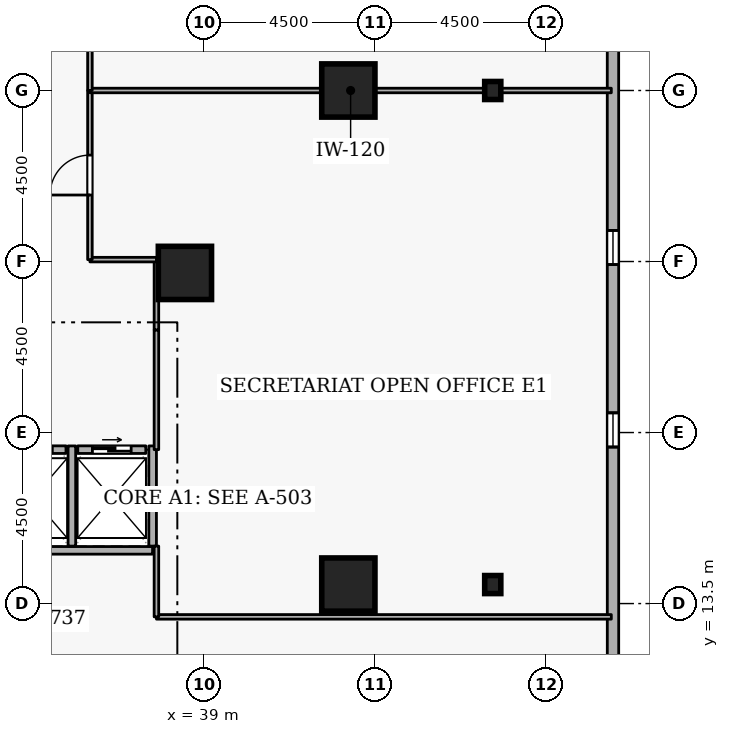
"""IFC4 building model, lengths in metres.
Left out: names, types, materials, properties, quantities, classifications, styles, units other than length and angle.
Written with IfcOpenShell. Run it as: python <this file> out.ifc"""

import sys

from ifc_helpers import new_model, si_unit, direction, frame, frame_2d, origin, origin_2d, place, context, subcontext, project, spatial, rectangle, i_section, extrude, element, fill, save


model = new_model("IFC4")
c1 = context("Model", 3, precision=1e-05, world=origin(), true_north=direction((0.0, 1.0)))
c2 = subcontext(c1, "Body", "Model", "MODEL_VIEW")
j1 = project(units=[si_unit("LENGTHUNIT", "METRE"), si_unit("PLANEANGLEUNIT", "RADIAN")], contexts=[c1])
p1 = place(None, origin())
s1 = spatial("IfcSite", under=j1, at=p1, CompositionType="ELEMENT")
p2 = place(p1, origin())
s2 = spatial("IfcBuilding", under=s1, at=p2, CompositionType="ELEMENT")
p3 = place(p2, frame((0.0, 0.0, 60.9)))
s3 = spatial("IfcBuildingStorey", under=s2, at=p3, CompositionType="ELEMENT", Elevation=60.9)
for number, where, z_axis, x_axis in (
    (1, (42.8, 14.0, 0.0), (0.0, 0.0, 1.0), (1.0, 0.0, 0.0)),
    (2, (42.8, 27.0, 0.0), (0.0, 0.0, 1.0), (1.0, 0.0, 0.0)),
    (3, (38.5, 22.2, 0.0), (0.0, 0.0, 1.0), (1.0, 0.0, 0.0)),
):
    element("IfcColumn", number, at=place(p3, frame(where, z_axis=z_axis, x_axis=x_axis)), inside=s3, PredefinedType="COLUMN", context=c2, shape_type="SweptSolid", body=[
        extrude(rectangle(XDim=1.4, YDim=1.4, at=origin_2d()), origin(), (0.0, 0.0, 1.0), 3.6),
    ])
for number, where, z_axis, x_axis in (
    (4, (46.6, 14.0, 0.0), (0.0, 0.0, 1.0), (1.0, 0.0, 0.0)),
    (5, (46.6, 27.0, 0.0), (0.0, 0.0, 1.0), (1.0, 0.0, 0.0)),
):
    element("IfcColumn", number, at=place(p3, frame(where, z_axis=z_axis, x_axis=x_axis)), inside=s3, PredefinedType="COLUMN", context=c2, shape_type="SweptSolid", body=[
        extrude(i_section(OverallWidth=0.424, OverallDepth=0.475, WebThickness=0.048, FlangeThickness=0.077, FilletRadius=0.015, at=origin_2d()), origin(), (0.0, 0.0, 1.0), 3.6),
    ])
p4 = place(p3, frame((49.765, 5.319, 0.0), z_axis=(0.0, 0.0, 1.0), x_axis=(-5.985515e-05, 0.999999998209, 0.0)))
e6 = element("IfcWall", 6, at=p4, inside=s3, PredefinedType="STANDARD", context=c2, shape_type="SweptSolid", body=[
    extrude(rectangle(XDim=36.71, YDim=0.3, at=frame_2d((18.355, 0.0))), origin(), (0.0, 0.0, 1.0), 2.7),
])
p5 = place(p4, frame((2.7, 0.0, 0.72)))
e7 = element("IfcOpeningElement", 7, at=p5, cuts=e6, PredefinedType="OPENING", context=c2, shape_type="SweptSolid", body=[
    extrude(rectangle(XDim=0.9, YDim=1.75, at=frame_2d((0.45, 0.875))), frame((0.0, 0.16, 0.0), z_axis=(0.0, -1.0, 0.0), x_axis=(1.0, 0.0, 0.0)), (0.0, 0.0, 1.0), 0.32),
])
p6 = place(p4, frame((12.3, 0.0, 0.72)))
e8 = element("IfcOpeningElement", 8, at=p6, cuts=e6, PredefinedType="OPENING", context=c2, shape_type="SweptSolid", body=[
    extrude(rectangle(XDim=0.9, YDim=1.75, at=frame_2d((0.45, 0.875))), frame((0.0, 0.16, 0.0), z_axis=(0.0, -1.0, 0.0), x_axis=(1.0, 0.0, 0.0)), (0.0, 0.0, 1.0), 0.32),
])
p7 = place(p4, frame((17.1, 0.0, 0.72)))
e9 = element("IfcOpeningElement", 9, at=p7, cuts=e6, PredefinedType="OPENING", context=c2, shape_type="SweptSolid", body=[
    extrude(rectangle(XDim=0.9, YDim=1.75, at=frame_2d((0.45, 0.875))), frame((0.0, 0.16, 0.0), z_axis=(0.0, -1.0, 0.0), x_axis=(1.0, 0.0, 0.0)), (0.0, 0.0, 1.0), 0.32),
])
p8 = place(p4, frame((26.7, 0.0, 0.72)))
e10 = element("IfcOpeningElement", 10, at=p8, cuts=e6, PredefinedType="OPENING", context=c2, shape_type="SweptSolid", body=[
    extrude(rectangle(XDim=0.9, YDim=1.75, at=frame_2d((0.45, 0.875))), frame((0.0, 0.16, 0.0), z_axis=(0.0, -1.0, 0.0), x_axis=(1.0, 0.0, 0.0)), (0.0, 0.0, 1.0), 0.32),
])
p9 = place(p4, frame((31.5, 0.0, 0.72)))
e11 = element("IfcOpeningElement", 11, at=p9, cuts=e6, PredefinedType="OPENING", context=c2, shape_type="SweptSolid", body=[
    extrude(rectangle(XDim=0.9, YDim=1.75, at=frame_2d((0.45, 0.875))), frame((0.0, 0.16, 0.0), z_axis=(0.0, -1.0, 0.0), x_axis=(1.0, 0.0, 0.0)), (0.0, 0.0, 1.0), 0.32),
])
p10 = place(p3, frame((33.63, 17.55, 0.0), z_axis=(0.0, 0.0, 1.0), x_axis=(1.0, 0.0, 0.0)))
e12 = element("IfcWall", 12, at=p10, inside=s3, PredefinedType="STANDARD", context=c2, shape_type="SweptSolid", body=[
    extrude(rectangle(XDim=1.74, YDim=0.2, at=frame_2d((0.87, 0.0))), origin(), (0.0, 0.0, 1.0), 3.34),
])
p11 = place(p10, frame((0.36, 0.0, 0.0)))
e13 = element("IfcOpeningElement", 13, at=p11, cuts=e12, PredefinedType="OPENING", context=c2, shape_type="SweptSolid", body=[
    extrude(rectangle(XDim=1.02, YDim=2.06, at=frame_2d((0.51, 1.03))), frame((0.0, 0.11, 0.0), z_axis=(0.0, -1.0, 0.0), x_axis=(1.0, 0.0, 0.0)), (0.0, 0.0, 1.0), 0.22),
])
p12 = place(p3, frame((35.68, 17.55, 0.0), z_axis=(0.0, 0.0, 1.0), x_axis=(1.0, 0.0, 0.0)))
e14 = element("IfcWall", 14, at=p12, inside=s3, PredefinedType="STANDARD", context=c2, shape_type="SweptSolid", body=[
    extrude(rectangle(XDim=1.79, YDim=0.2, at=frame_2d((0.895, 0.0))), origin(), (0.0, 0.0, 1.0), 3.34),
])
p13 = place(p12, frame((0.385, 0.0, 0.0)))
e15 = element("IfcOpeningElement", 15, at=p13, cuts=e14, PredefinedType="OPENING", context=c2, shape_type="SweptSolid", body=[
    extrude(rectangle(XDim=1.02, YDim=2.06, at=frame_2d((0.51, 1.03))), frame((0.0, 0.11, 0.0), z_axis=(0.0, -1.0, 0.0), x_axis=(1.0, 0.0, 0.0)), (0.0, 0.0, 1.0), 0.22),
])
p14 = place(p3, frame((33.452, 14.9, 0.0), z_axis=(0.0, 0.0, 1.0), x_axis=(1.0, 0.0, 0.0)))
e16 = element("IfcWall", 16, at=p14, inside=s3, PredefinedType="STANDARD", context=c2, shape_type="SweptSolid", body=[
    extrude(rectangle(XDim=4.196, YDim=0.2, at=frame_2d((2.098, 0.0))), origin(), (0.0, 0.0, 1.0), 3.34),
])
for number, where, z_axis, x_axis in (
    (17, (35.525, 15.012, 0.0), (0.0, 0.0, 1.0), (0.0, 1.0, 0.0)),
    (18, (37.65, 15.012, 0.0), (0.0, 0.0, 1.0), (0.0, 1.0, 0.0)),
):
    element("IfcWall", number, at=place(p3, frame(where, z_axis=z_axis, x_axis=x_axis)), inside=s3, PredefinedType="STANDARD", context=c2, shape_type="SweptSolid", body=[
        extrude(rectangle(XDim=2.636, YDim=0.2, at=frame_2d((1.318, 0.0))), origin(), (0.0, 0.0, 1.0), 3.34),
    ])
p15 = place(p3, frame((37.75, 17.55, 0.0), z_axis=(0.0, 0.0, 1.0), x_axis=(0.0, 1.0, 0.0)))
e19 = element("IfcWall", 19, at=p15, inside=s3, PredefinedType="PARTITIONING", context=c2, shape_type="SweptSolid", body=[
    extrude(rectangle(XDim=3.15, YDim=0.12, at=frame_2d((1.575, 0.0))), origin(), (0.0, 0.0, 1.0), 3.34),
])
p16 = place(p3, frame((37.75, 20.7, 0.0), z_axis=(0.0, 0.0, 1.0), x_axis=(0.0, 1.0, 0.0)))
e20 = element("IfcWall", 20, at=p16, inside=s3, PredefinedType="PARTITIONING", context=c2, shape_type="SweptSolid", body=[
    extrude(rectangle(XDim=1.85, YDim=0.12, at=frame_2d((0.925, 0.0))), origin(), (0.0, 0.0, 1.0), 3.34),
])
p17 = place(p3, frame((37.75, 22.55, 0.0), z_axis=(0.0, 0.0, 1.0), x_axis=(-1.0, 0.0, 0.0)))
e21 = element("IfcWall", 21, at=p17, inside=s3, PredefinedType="PARTITIONING", context=c2, shape_type="SweptSolid", body=[
    extrude(rectangle(XDim=1.75, YDim=0.12, at=frame_2d((0.875, 0.0))), origin(), (0.0, 0.0, 1.0), 3.34),
])
p18 = place(p3, frame((36.0, 22.55, 0.0), z_axis=(0.0, 0.0, 1.0), x_axis=(0.0, 1.0, 0.0)))
e22 = element("IfcWall", 22, at=p18, inside=s3, PredefinedType="PARTITIONING", context=c2, shape_type="SweptSolid", body=[
    extrude(rectangle(XDim=4.45, YDim=0.12, at=frame_2d((2.225, 0.0))), origin(), (0.0, 0.0, 1.0), 3.34),
])
p19 = place(p18, frame((1.7, 0.0, 0.0)))
e23 = element("IfcOpeningElement", 23, at=p19, cuts=e22, PredefinedType="OPENING", context=c2, shape_type="SweptSolid", body=[
    extrude(rectangle(XDim=1.05, YDim=2.1, at=frame_2d((0.525, 1.05))), frame((0.0, 0.07, 0.0), z_axis=(0.0, -1.0, 0.0), x_axis=(1.0, 0.0, 0.0)), (0.0, 0.0, 1.0), 0.14),
])
p20 = place(p3, frame((36.0, 27.0, 0.0), z_axis=(0.0, 0.0, 1.0), x_axis=(1.0, 0.0, 0.0)))
e24 = element("IfcWall", 24, at=p20, inside=s3, PredefinedType="PARTITIONING", context=c2, shape_type="SweptSolid", body=[
    extrude(rectangle(XDim=13.72, YDim=0.12, at=frame_2d((6.86, 0.0))), origin(), (0.0, 0.0, 1.0), 2.878),
])
p21 = place(p3, frame((49.72, 13.15, 0.0), z_axis=(0.0, 0.0, 1.0), x_axis=(-1.0, 0.0, 0.0)))
e25 = element("IfcWall", 25, at=p21, inside=s3, PredefinedType="PARTITIONING", context=c2, shape_type="SweptSolid", body=[
    extrude(rectangle(XDim=11.97, YDim=0.12, at=frame_2d((5.985, 0.0))), origin(), (0.0, 0.0, 1.0), 3.34),
])
p22 = place(p3, frame((37.75, 13.15, 0.0), z_axis=(0.0, 0.0, 1.0), x_axis=(0.0, 1.0, 0.0)))
e26 = element("IfcWall", 26, at=p22, inside=s3, PredefinedType="PARTITIONING", context=c2, shape_type="SweptSolid", body=[
    extrude(rectangle(XDim=1.862, YDim=0.12, at=frame_2d((0.931, 0.0))), origin(), (0.0, 0.0, 1.0), 3.34),
])
p23 = place(p3, frame((36.0, 27.0, 0.0), z_axis=(0.0, 0.0, 1.0), x_axis=(0.0, 1.0, 0.0)))
e27 = element("IfcWall", 27, at=p23, inside=s3, PredefinedType="PARTITIONING", context=c2, shape_type="SweptSolid", body=[
    extrude(rectangle(XDim=3.15, YDim=0.12, at=frame_2d((1.575, 0.0))), origin(), (0.0, 0.0, 1.0), 3.34),
])
p24 = place(p23, frame((1.1, 0.0, 0.0)))
e28 = element("IfcOpeningElement", 28, at=p24, cuts=e27, PredefinedType="OPENING", context=c2, shape_type="SweptSolid", body=[
    extrude(rectangle(XDim=0.95, YDim=2.1, at=frame_2d((0.475, 1.05))), frame((0.0, 0.07, 0.0), z_axis=(0.0, -1.0, 0.0), x_axis=(1.0, 0.0, 0.0)), (0.0, 0.0, 1.0), 0.14),
])
p25 = place(p6, origin())
e29 = element("IfcWindow", 29, at=p25, inside=s3, PartitioningType="SINGLE_PANEL", PredefinedType="WINDOW", context=c2, shape_type="SweptSolid", body=[
    extrude(rectangle(XDim=0.9, YDim=1.75, at=frame_2d((0.45, 0.875))), frame((0.0, 0.03, 0.0), z_axis=(0.0, -1.0, 0.0), x_axis=(1.0, 0.0, 0.0)), (0.0, 0.0, 1.0), 0.06),
])
fill(e8, e29)
p26 = place(p7, origin())
e30 = element("IfcWindow", 30, at=p26, inside=s3, PartitioningType="SINGLE_PANEL", PredefinedType="WINDOW", context=c2, shape_type="SweptSolid", body=[
    extrude(rectangle(XDim=0.9, YDim=1.75, at=frame_2d((0.45, 0.875))), frame((0.0, 0.03, 0.0), z_axis=(0.0, -1.0, 0.0), x_axis=(1.0, 0.0, 0.0)), (0.0, 0.0, 1.0), 0.06),
])
fill(e9, e30)
p27 = place(p11, origin())
e31 = element("IfcDoor", 31, at=p27, inside=s3, OperationType="SLIDING_TO_LEFT", PredefinedType="DOOR", context=c2, shape_type="SweptSolid", body=[
    extrude(rectangle(XDim=1.02, YDim=2.06, at=frame_2d((0.51, 1.03))), frame((0.0, 0.025, 0.0), z_axis=(0.0, -1.0, 0.0), x_axis=(1.0, 0.0, 0.0)), (0.0, 0.0, 1.0), 0.05),
])
fill(e13, e31)
p28 = place(p13, origin())
e32 = element("IfcDoor", 32, at=p28, inside=s3, OperationType="SLIDING_TO_LEFT", PredefinedType="DOOR", context=c2, shape_type="SweptSolid", body=[
    extrude(rectangle(XDim=1.02, YDim=2.06, at=frame_2d((0.51, 1.03))), frame((0.0, 0.025, 0.0), z_axis=(0.0, -1.0, 0.0), x_axis=(1.0, 0.0, 0.0)), (0.0, 0.0, 1.0), 0.05),
])
fill(e15, e32)
p29 = place(p19, origin())
e33 = element("IfcDoor", 33, at=p29, inside=s3, OperationType="SINGLE_SWING_LEFT", PredefinedType="DOOR", context=c2, shape_type="SweptSolid", body=[
    extrude(rectangle(XDim=1.05, YDim=2.1, at=frame_2d((0.525, 1.05))), frame((0.0, 0.025, 0.0), z_axis=(0.0, -1.0, 0.0), x_axis=(1.0, 0.0, 0.0)), (0.0, 0.0, 1.0), 0.05),
])
fill(e23, e33)
save(model, sys.argv[1])
